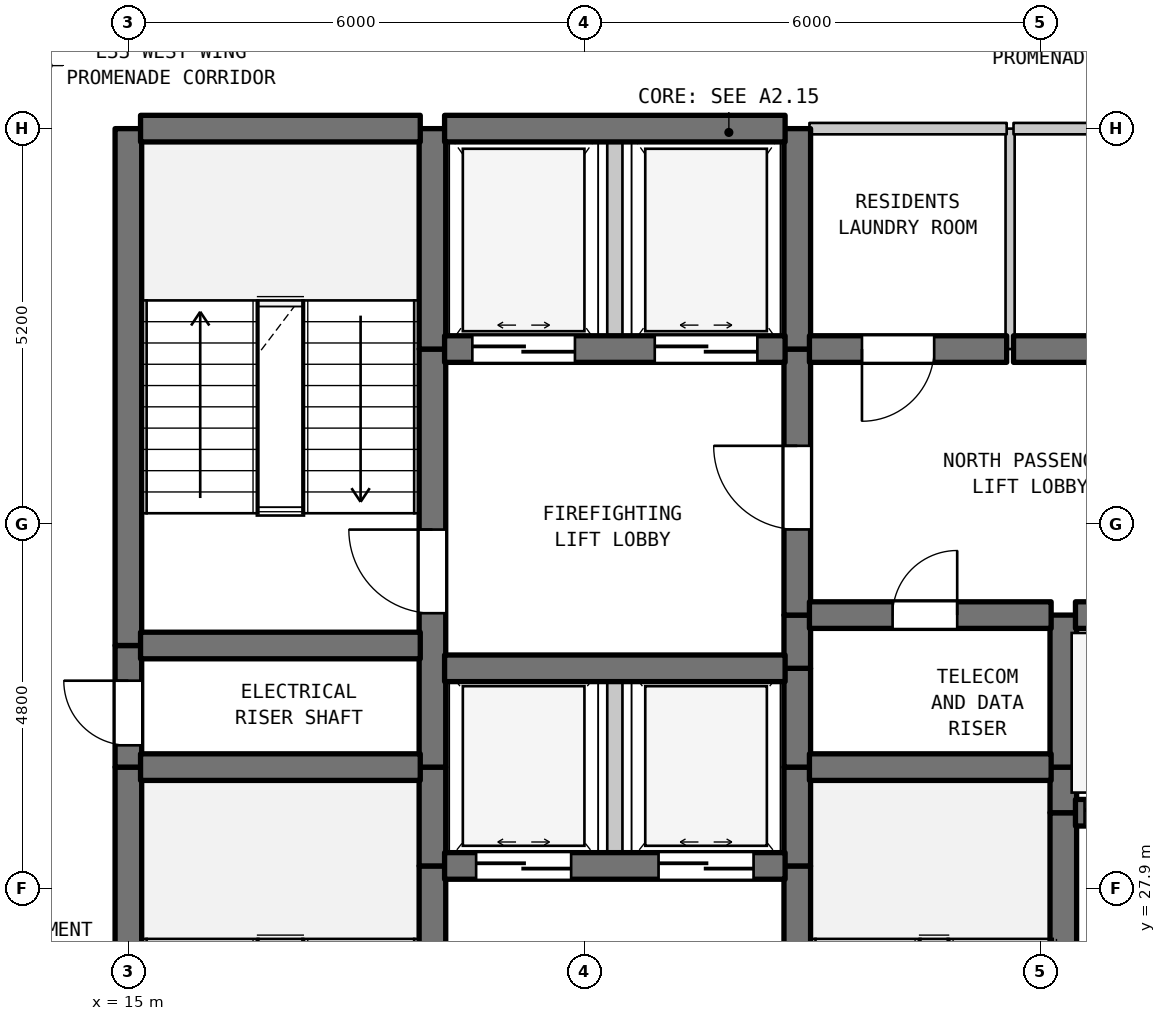
"""IFC4 building model, lengths in metres.
Left out: names, types, materials, properties, quantities, classifications, styles, units other than length and angle.
Written with IfcOpenShell. Run it as: python <this file> out.ifc"""

import sys

from ifc_helpers import new_model, si_unit, direction, frame, frame_2d, origin, place, context, subcontext, project, spatial, rectangle, extrude, element, fill, save


model = new_model("IFC4")
c1 = context("Model", 3, precision=1e-05, world=origin(), true_north=direction((0.0, 1.0)))
c2 = subcontext(c1, "Body", "Model", "MODEL_VIEW")
j1 = project(units=[si_unit("LENGTHUNIT", "METRE"), si_unit("PLANEANGLEUNIT", "RADIAN")], contexts=[c1])
p1 = place(None, origin())
s1 = spatial("IfcSite", under=j1, at=p1, CompositionType="ELEMENT")
p2 = place(p1, origin())
s2 = spatial("IfcBuilding", under=s1, at=p2, CompositionType="ELEMENT")
p3 = place(p2, frame((0.0, 0.0, 137.2)))
s3 = spatial("IfcBuildingStorey", under=s2, at=p3, CompositionType="ELEMENT", Elevation=137.2)
p4 = place(p3, frame((15.0, 22.7, 0.0), z_axis=(0.0, 0.0, 1.0), x_axis=(0.0, 1.0, 0.0)))
e1 = element("IfcWall", 1, at=p4, inside=s3, PredefinedType="SHEAR", context=c2, shape_type="SweptSolid", body=[
    extrude(rectangle(XDim=6.8, YDim=0.35, at=frame_2d((3.4, 0.0))), origin(), (0.0, 0.0, 1.0), 3.385),
])
p5 = place(p3, frame((15.0, 29.5, 0.0), z_axis=(0.0, 0.0, 1.0), x_axis=(0.0, 1.0, 0.0)))
e2 = element("IfcWall", 2, at=p5, inside=s3, PredefinedType="SHEAR", context=c2, shape_type="SweptSolid", body=[
    extrude(rectangle(XDim=1.6, YDim=0.35, at=frame_2d((0.8, 0.0))), origin(), (0.0, 0.0, 1.0), 3.385),
])
p6 = place(p5, frame((0.287, 0.0, 0.0)))
e3 = element("IfcOpeningElement", 3, at=p6, cuts=e2, PredefinedType="OPENING", context=c2, shape_type="SweptSolid", body=[
    extrude(rectangle(XDim=0.85, YDim=2.1, at=frame_2d((0.425, 1.05))), frame((0.0, 0.185, 0.0), z_axis=(0.0, -1.0, 0.0), x_axis=(1.0, 0.0, 0.0)), (0.0, 0.0, 1.0), 0.37),
])
p7 = place(p3, frame((15.0, 31.1, 0.0), z_axis=(0.0, 0.0, 1.0), x_axis=(0.0, 1.0, 0.0)))
e4 = element("IfcWall", 4, at=p7, inside=s3, PredefinedType="SHEAR", context=c2, shape_type="SweptSolid", body=[
    extrude(rectangle(XDim=6.8, YDim=0.35, at=frame_2d((3.4, 0.0))), origin(), (0.0, 0.0, 1.0), 3.385),
])
p8 = place(p3, frame((19.0, 22.7, 0.0), z_axis=(0.0, 0.0, 1.0), x_axis=(0.0, 1.0, 0.0)))
e5 = element("IfcWall", 5, at=p8, inside=s3, PredefinedType="SHEAR", context=c2, shape_type="SweptSolid", body=[
    extrude(rectangle(XDim=5.5, YDim=0.35, at=frame_2d((2.75, 0.0))), origin(), (0.0, 0.0, 1.0), 3.385),
])
p9 = place(p8, frame((0.631, 0.0, 0.0)))
e6 = element("IfcOpeningElement", 6, at=p9, cuts=e5, PredefinedType="OPENING", context=c2, shape_type="SweptSolid", body=[
    extrude(rectangle(XDim=1.1, YDim=2.15, at=frame_2d((0.55, 1.075))), frame((0.0, 0.185, 0.0), z_axis=(0.0, -1.0, 0.0), x_axis=(1.0, 0.0, 0.0)), (0.0, 0.0, 1.0), 0.37),
])
p10 = place(p3, frame((19.0, 28.2, 0.0), z_axis=(0.0, 0.0, 1.0), x_axis=(0.0, 1.0, 0.0)))
e7 = element("IfcWall", 7, at=p10, inside=s3, PredefinedType="SHEAR", context=c2, shape_type="SweptSolid", body=[
    extrude(rectangle(XDim=1.3, YDim=0.35, at=frame_2d((0.65, 0.0))), origin(), (0.0, 0.0, 1.0), 3.385),
])
p11 = place(p3, frame((19.0, 29.5, 0.0), z_axis=(0.0, 0.0, 1.0), x_axis=(0.0, 1.0, 0.0)))
e8 = element("IfcWall", 8, at=p11, inside=s3, PredefinedType="SHEAR", context=c2, shape_type="SweptSolid", body=[
    extrude(rectangle(XDim=5.5, YDim=0.35, at=frame_2d((2.75, 0.0))), origin(), (0.0, 0.0, 1.0), 3.385),
])
p12 = place(p11, frame((2.025, 0.0, 0.0)))
e9 = element("IfcOpeningElement", 9, at=p12, cuts=e8, PredefinedType="OPENING", context=c2, shape_type="SweptSolid", body=[
    extrude(rectangle(XDim=1.1, YDim=2.15, at=frame_2d((0.55, 1.075))), frame((0.0, 0.185, 0.0), z_axis=(0.0, -1.0, 0.0), x_axis=(1.0, 0.0, 0.0)), (0.0, 0.0, 1.0), 0.37),
])
p13 = place(p3, frame((19.0, 35.0, 0.0), z_axis=(0.0, 0.0, 1.0), x_axis=(0.0, 1.0, 0.0)))
e10 = element("IfcWall", 10, at=p13, inside=s3, PredefinedType="SHEAR", context=c2, shape_type="SweptSolid", body=[
    extrude(rectangle(XDim=2.9, YDim=0.35, at=frame_2d((1.45, 0.0))), origin(), (0.0, 0.0, 1.0), 3.385),
])
p14 = place(p3, frame((21.4, 28.2, 0.0), z_axis=(0.0, 0.0, 1.0), x_axis=(0.0, 1.0, 0.0)))
e11 = element("IfcWall", 11, at=p14, inside=s3, PredefinedType="STANDARD", context=c2, shape_type="SweptSolid", body=[
    extrude(rectangle(XDim=2.6, YDim=0.2, at=frame_2d((1.3, 0.0))), origin(), (0.0, 0.0, 1.0), 3.385),
])
p15 = place(p3, frame((21.4, 35.0, 0.0), z_axis=(0.0, 0.0, 1.0), x_axis=(0.0, 1.0, 0.0)))
e12 = element("IfcWall", 12, at=p15, inside=s3, PredefinedType="STANDARD", context=c2, shape_type="SweptSolid", body=[
    extrude(rectangle(XDim=2.9, YDim=0.2, at=frame_2d((1.45, 0.0))), origin(), (0.0, 0.0, 1.0), 3.385),
])
p16 = place(p3, frame((23.8, 22.7, 0.0), z_axis=(0.0, 0.0, 1.0), x_axis=(0.0, 1.0, 0.0)))
e13 = element("IfcWall", 13, at=p16, inside=s3, PredefinedType="SHEAR", context=c2, shape_type="SweptSolid", body=[
    extrude(rectangle(XDim=5.5, YDim=0.35, at=frame_2d((2.75, 0.0))), origin(), (0.0, 0.0, 1.0), 3.385),
])
p17 = place(p16, frame((0.235, 0.0, 0.0)))
e14 = element("IfcOpeningElement", 14, at=p17, cuts=e13, PredefinedType="OPENING", context=c2, shape_type="SweptSolid", body=[
    extrude(rectangle(XDim=1.1, YDim=2.15, at=frame_2d((0.55, 1.075))), frame((0.0, 0.185, 0.0), z_axis=(0.0, -1.0, 0.0), x_axis=(1.0, 0.0, 0.0)), (0.0, 0.0, 1.0), 0.37),
])
for number, where, z_axis, x_axis in (
    (15, (23.8, 28.2, 0.0), (0.0, 0.0, 1.0), (0.0, 1.0, 0.0)),
    (16, (23.8, 29.5, 0.0), (0.0, 0.0, 1.0), (0.0, 1.0, 0.0)),
):
    element("IfcWall", number, at=place(p3, frame(where, z_axis=z_axis, x_axis=x_axis)), inside=s3, PredefinedType="SHEAR", context=c2, shape_type="SweptSolid", body=[
        extrude(rectangle(XDim=1.3, YDim=0.35, at=frame_2d((0.65, 0.0))), origin(), (0.0, 0.0, 1.0), 3.385),
    ])
p18 = place(p3, frame((23.8, 30.8, 0.0), z_axis=(0.0, 0.0, 1.0), x_axis=(0.0, 1.0, 0.0)))
e17 = element("IfcWall", 17, at=p18, inside=s3, PredefinedType="SHEAR", context=c2, shape_type="SweptSolid", body=[
    extrude(rectangle(XDim=0.7, YDim=0.35, at=frame_2d((0.35, 0.0))), origin(), (0.0, 0.0, 1.0), 3.385),
])
p19 = place(p3, frame((23.8, 31.5, 0.0), z_axis=(0.0, 0.0, 1.0), x_axis=(0.0, 1.0, 0.0)))
e18 = element("IfcWall", 18, at=p19, inside=s3, PredefinedType="SHEAR", context=c2, shape_type="SweptSolid", body=[
    extrude(rectangle(XDim=3.5, YDim=0.35, at=frame_2d((1.75, 0.0))), origin(), (0.0, 0.0, 1.0), 3.385),
])
p20 = place(p19, frame((1.127, 0.0, 0.0)))
e19 = element("IfcOpeningElement", 19, at=p20, cuts=e18, PredefinedType="OPENING", context=c2, shape_type="SweptSolid", body=[
    extrude(rectangle(XDim=1.1, YDim=2.15, at=frame_2d((0.55, 1.075))), frame((0.0, 0.185, 0.0), z_axis=(0.0, -1.0, 0.0), x_axis=(1.0, 0.0, 0.0)), (0.0, 0.0, 1.0), 0.37),
])
p21 = place(p3, frame((23.8, 35.0, 0.0), z_axis=(0.0, 0.0, 1.0), x_axis=(0.0, 1.0, 0.0)))
e20 = element("IfcWall", 20, at=p21, inside=s3, PredefinedType="SHEAR", context=c2, shape_type="SweptSolid", body=[
    extrude(rectangle(XDim=2.9, YDim=0.35, at=frame_2d((1.45, 0.0))), origin(), (0.0, 0.0, 1.0), 3.385),
])
p22 = place(p3, frame((26.6, 35.0, 0.0), z_axis=(0.0, 0.0, 1.0), x_axis=(0.0, 1.0, 0.0)))
e21 = element("IfcWall", 21, at=p22, inside=s3, PredefinedType="PARTITIONING", context=c2, shape_type="SweptSolid", body=[
    extrude(rectangle(XDim=2.9, YDim=0.12, at=frame_2d((1.45, 0.0))), origin(), (0.0, 0.0, 1.0), 3.385),
])
p23 = place(p3, frame((27.3, 25.6, 0.0), z_axis=(0.0, 0.0, 1.0), x_axis=(0.0, 1.0, 0.0)))
e22 = element("IfcWall", 22, at=p23, inside=s3, PredefinedType="SHEAR", context=c2, shape_type="SweptSolid", body=[
    extrude(rectangle(XDim=3.3, YDim=0.35, at=frame_2d((1.65, 0.0))), origin(), (0.0, 0.0, 1.0), 3.385),
])
p24 = place(p3, frame((27.3, 28.9, 0.0), z_axis=(0.0, 0.0, 1.0), x_axis=(0.0, 1.0, 0.0)))
e23 = element("IfcWall", 23, at=p24, inside=s3, PredefinedType="SHEAR", context=c2, shape_type="SweptSolid", body=[
    extrude(rectangle(XDim=0.6, YDim=0.35, at=frame_2d((0.3, 0.0))), origin(), (0.0, 0.0, 1.0), 3.385),
])
p25 = place(p3, frame((27.3, 29.5, 0.0), z_axis=(0.0, 0.0, 1.0), x_axis=(0.0, 1.0, 0.0)))
e24 = element("IfcWall", 24, at=p25, inside=s3, PredefinedType="SHEAR", context=c2, shape_type="SweptSolid", body=[
    extrude(rectangle(XDim=2.0, YDim=0.35, at=frame_2d((1.0, 0.0))), origin(), (0.0, 0.0, 1.0), 3.385),
])
p26 = place(p3, frame((19.16, 28.2, 0.0), z_axis=(0.0, 0.0, 1.0), x_axis=(1.0, 0.0, 0.0)))
e25 = element("IfcWall", 25, at=p26, inside=s3, PredefinedType="SHEAR", context=c2, shape_type="SweptSolid", body=[
    extrude(rectangle(XDim=4.48, YDim=0.35, at=frame_2d((2.24, 0.0))), origin(), (0.0, 0.0, 1.0), 3.385),
])
p27 = place(p26, frame((0.415, 0.0, 0.0)))
e26 = element("IfcOpeningElement", 26, at=p27, cuts=e25, PredefinedType="OPENING", context=c2, shape_type="SweptSolid", body=[
    extrude(rectangle(XDim=1.25, YDim=2.2, at=frame_2d((0.625, 1.1))), frame((0.0, 0.185, 0.0), z_axis=(0.0, -1.0, 0.0), x_axis=(1.0, 0.0, 0.0)), (0.0, 0.0, 1.0), 0.37),
])
p28 = place(p26, frame((2.815, 0.0, 0.0)))
e27 = element("IfcOpeningElement", 27, at=p28, cuts=e25, PredefinedType="OPENING", context=c2, shape_type="SweptSolid", body=[
    extrude(rectangle(XDim=1.25, YDim=2.2, at=frame_2d((0.625, 1.1))), frame((0.0, 0.185, 0.0), z_axis=(0.0, -1.0, 0.0), x_axis=(1.0, 0.0, 0.0)), (0.0, 0.0, 1.0), 0.37),
])
p29 = place(p3, frame((27.46, 28.9, 0.0), z_axis=(0.0, 0.0, 1.0), x_axis=(1.0, 0.0, 0.0)))
e28 = element("IfcWall", 28, at=p29, inside=s3, PredefinedType="SHEAR", context=c2, shape_type="SweptSolid", body=[
    extrude(rectangle(XDim=3.18, YDim=0.35, at=frame_2d((1.59, 0.0))), origin(), (0.0, 0.0, 1.0), 3.385),
])
p30 = place(p29, frame((0.12, 0.0, 0.0)))
e29 = element("IfcOpeningElement", 29, at=p30, cuts=e28, PredefinedType="OPENING", context=c2, shape_type="SweptSolid", body=[
    extrude(rectangle(XDim=1.25, YDim=2.2, at=frame_2d((0.625, 1.1))), frame((0.0, 0.185, 0.0), z_axis=(0.0, -1.0, 0.0), x_axis=(1.0, 0.0, 0.0)), (0.0, 0.0, 1.0), 0.37),
])
p31 = place(p29, frame((1.81, 0.0, 0.0)))
e30 = element("IfcOpeningElement", 30, at=p31, cuts=e28, PredefinedType="OPENING", context=c2, shape_type="SweptSolid", body=[
    extrude(rectangle(XDim=1.25, YDim=2.2, at=frame_2d((0.625, 1.1))), frame((0.0, 0.185, 0.0), z_axis=(0.0, -1.0, 0.0), x_axis=(1.0, 0.0, 0.0)), (0.0, 0.0, 1.0), 0.37),
])
p32 = place(p3, frame((15.16, 29.5, 0.0), z_axis=(0.0, 0.0, 1.0), x_axis=(1.0, 0.0, 0.0)))
e31 = element("IfcWall", 31, at=p32, inside=s3, PredefinedType="SHEAR", context=c2, shape_type="SweptSolid", body=[
    extrude(rectangle(XDim=3.68, YDim=0.35, at=frame_2d((1.84, 0.0))), origin(), (0.0, 0.0, 1.0), 3.385),
])
p33 = place(p3, frame((23.96, 29.5, 0.0), z_axis=(0.0, 0.0, 1.0), x_axis=(1.0, 0.0, 0.0)))
e32 = element("IfcWall", 32, at=p33, inside=s3, PredefinedType="SHEAR", context=c2, shape_type="SweptSolid", body=[
    extrude(rectangle(XDim=3.18, YDim=0.35, at=frame_2d((1.59, 0.0))), origin(), (0.0, 0.0, 1.0), 3.385),
])
p34 = place(p3, frame((19.16, 30.8, 0.0), z_axis=(0.0, 0.0, 1.0), x_axis=(1.0, 0.0, 0.0)))
e33 = element("IfcWall", 33, at=p34, inside=s3, PredefinedType="SHEAR", context=c2, shape_type="SweptSolid", body=[
    extrude(rectangle(XDim=4.48, YDim=0.35, at=frame_2d((2.24, 0.0))), origin(), (0.0, 0.0, 1.0), 3.385),
])
p35 = place(p3, frame((15.16, 31.1, 0.0), z_axis=(0.0, 0.0, 1.0), x_axis=(1.0, 0.0, 0.0)))
e34 = element("IfcWall", 34, at=p35, inside=s3, PredefinedType="SHEAR", context=c2, shape_type="SweptSolid", body=[
    extrude(rectangle(XDim=3.68, YDim=0.35, at=frame_2d((1.84, 0.0))), origin(), (0.0, 0.0, 1.0), 3.385),
])
p36 = place(p3, frame((23.96, 31.5, 0.0), z_axis=(0.0, 0.0, 1.0), x_axis=(1.0, 0.0, 0.0)))
e35 = element("IfcWall", 35, at=p36, inside=s3, PredefinedType="SHEAR", context=c2, shape_type="SweptSolid", body=[
    extrude(rectangle(XDim=3.18, YDim=0.35, at=frame_2d((1.59, 0.0))), origin(), (0.0, 0.0, 1.0), 3.385),
])
p37 = place(p36, frame((1.094, 0.0, 0.0)))
e36 = element("IfcOpeningElement", 36, at=p37, cuts=e35, PredefinedType="OPENING", context=c2, shape_type="SweptSolid", body=[
    extrude(rectangle(XDim=0.85, YDim=2.1, at=frame_2d((0.425, 1.05))), frame((0.0, 0.185, 0.0), z_axis=(0.0, -1.0, 0.0), x_axis=(1.0, 0.0, 0.0)), (0.0, 0.0, 1.0), 0.37),
])
p38 = place(p3, frame((27.46, 31.5, 0.0), z_axis=(0.0, 0.0, 1.0), x_axis=(1.0, 0.0, 0.0)))
e37 = element("IfcWall", 37, at=p38, inside=s3, PredefinedType="SHEAR", context=c2, shape_type="SweptSolid", body=[
    extrude(rectangle(XDim=3.18, YDim=0.35, at=frame_2d((1.59, 0.0))), origin(), (0.0, 0.0, 1.0), 3.385),
])
p39 = place(p3, frame((19.16, 35.0, 0.0), z_axis=(0.0, 0.0, 1.0), x_axis=(1.0, 0.0, 0.0)))
e38 = element("IfcWall", 38, at=p39, inside=s3, PredefinedType="SHEAR", context=c2, shape_type="SweptSolid", body=[
    extrude(rectangle(XDim=4.48, YDim=0.35, at=frame_2d((2.24, 0.0))), origin(), (0.0, 0.0, 1.0), 3.385),
])
p40 = place(p39, frame((0.365, 0.0, 0.0)))
e39 = element("IfcOpeningElement", 39, at=p40, cuts=e38, PredefinedType="OPENING", context=c2, shape_type="SweptSolid", body=[
    extrude(rectangle(XDim=1.35, YDim=2.2, at=frame_2d((0.675, 1.1))), frame((0.0, 0.185, 0.0), z_axis=(0.0, -1.0, 0.0), x_axis=(1.0, 0.0, 0.0)), (0.0, 0.0, 1.0), 0.37),
])
p41 = place(p39, frame((2.765, 0.0, 0.0)))
e40 = element("IfcOpeningElement", 40, at=p41, cuts=e38, PredefinedType="OPENING", context=c2, shape_type="SweptSolid", body=[
    extrude(rectangle(XDim=1.35, YDim=2.2, at=frame_2d((0.675, 1.1))), frame((0.0, 0.185, 0.0), z_axis=(0.0, -1.0, 0.0), x_axis=(1.0, 0.0, 0.0)), (0.0, 0.0, 1.0), 0.37),
])
p42 = place(p3, frame((23.96, 35.0, 0.0), z_axis=(0.0, 0.0, 1.0), x_axis=(1.0, 0.0, 0.0)))
e41 = element("IfcWall", 41, at=p42, inside=s3, PredefinedType="SHEAR", context=c2, shape_type="SweptSolid", body=[
    extrude(rectangle(XDim=2.595, YDim=0.35, at=frame_2d((1.297, 0.0))), origin(), (0.0, 0.0, 1.0), 3.385),
])
p43 = place(p42, frame((0.691, 0.0, 0.0)))
e42 = element("IfcOpeningElement", 42, at=p43, cuts=e41, PredefinedType="OPENING", context=c2, shape_type="SweptSolid", body=[
    extrude(rectangle(XDim=0.95, YDim=2.15, at=frame_2d((0.475, 1.075))), frame((0.0, 0.185, 0.0), z_axis=(0.0, -1.0, 0.0), x_axis=(1.0, 0.0, 0.0)), (0.0, 0.0, 1.0), 0.37),
])
p44 = place(p3, frame((26.645, 35.0, 0.0), z_axis=(0.0, 0.0, 1.0), x_axis=(1.0, 0.0, 0.0)))
e43 = element("IfcWall", 43, at=p44, inside=s3, PredefinedType="SHEAR", context=c2, shape_type="SweptSolid", body=[
    extrude(rectangle(XDim=3.995, YDim=0.35, at=frame_2d((1.998, 0.0))), origin(), (0.0, 0.0, 1.0), 3.385),
])
p45 = place(p44, frame((1.508, 0.0, 0.0)))
e44 = element("IfcOpeningElement", 44, at=p45, cuts=e43, PredefinedType="OPENING", context=c2, shape_type="SweptSolid", body=[
    extrude(rectangle(XDim=0.95, YDim=2.15, at=frame_2d((0.475, 1.075))), frame((0.0, 0.185, 0.0), z_axis=(0.0, -1.0, 0.0), x_axis=(1.0, 0.0, 0.0)), (0.0, 0.0, 1.0), 0.37),
])
p46 = place(p3, frame((15.16, 37.9, 0.0), z_axis=(0.0, 0.0, 1.0), x_axis=(1.0, 0.0, 0.0)))
e45 = element("IfcWall", 45, at=p46, inside=s3, PredefinedType="SHEAR", context=c2, shape_type="SweptSolid", body=[
    extrude(rectangle(XDim=3.68, YDim=0.35, at=frame_2d((1.84, 0.0))), origin(), (0.0, 0.0, 1.0), 3.385),
])
p47 = place(p3, frame((19.16, 37.9, 0.0), z_axis=(0.0, 0.0, 1.0), x_axis=(1.0, 0.0, 0.0)))
e46 = element("IfcWall", 46, at=p47, inside=s3, PredefinedType="SHEAR", context=c2, shape_type="SweptSolid", body=[
    extrude(rectangle(XDim=4.48, YDim=0.35, at=frame_2d((2.24, 0.0))), origin(), (0.0, 0.0, 1.0), 3.385),
])
p48 = place(p3, frame((23.96, 37.9, 0.0), z_axis=(0.0, 0.0, 1.0), x_axis=(1.0, 0.0, 0.0)))
e47 = element("IfcWall", 47, at=p48, inside=s3, PredefinedType="STANDARD", context=c2, shape_type="SweptSolid", body=[
    extrude(rectangle(XDim=2.595, YDim=0.15, at=frame_2d((1.297, 0.0))), origin(), (0.0, 0.0, 1.0), 2.885),
])
p49 = place(p3, frame((26.645, 37.9, 0.0), z_axis=(0.0, 0.0, 1.0), x_axis=(1.0, 0.0, 0.0)))
e48 = element("IfcWall", 48, at=p49, inside=s3, PredefinedType="STANDARD", context=c2, shape_type="SweptSolid", body=[
    extrude(rectangle(XDim=4.095, YDim=0.15, at=frame_2d((2.047, 0.0))), origin(), (0.0, 0.0, 1.0), 2.885),
])
p50 = place(p6, origin())
e49 = element("IfcDoor", 49, at=p50, inside=s3, OperationType="SINGLE_SWING_RIGHT", PredefinedType="DOOR", context=c2, shape_type="SweptSolid", body=[
    extrude(rectangle(XDim=0.85, YDim=2.1, at=frame_2d((0.425, 1.05))), frame((0.0, 0.025, 0.0), z_axis=(0.0, -1.0, 0.0), x_axis=(1.0, 0.0, 0.0)), (0.0, 0.0, 1.0), 0.05),
])
fill(e3, e49)
p51 = place(p12, origin())
e50 = element("IfcDoor", 50, at=p51, inside=s3, OperationType="SINGLE_SWING_RIGHT", PredefinedType="DOOR", context=c2, shape_type="SweptSolid", body=[
    extrude(rectangle(XDim=1.1, YDim=2.15, at=frame_2d((0.55, 1.075))), frame((0.0, 0.025, 0.0), z_axis=(0.0, -1.0, 0.0), x_axis=(1.0, 0.0, 0.0)), (0.0, 0.0, 1.0), 0.05),
])
fill(e9, e50)
p52 = place(p20, origin())
e51 = element("IfcDoor", 51, at=p52, inside=s3, OperationType="SINGLE_SWING_RIGHT", PredefinedType="DOOR", context=c2, shape_type="SweptSolid", body=[
    extrude(rectangle(XDim=1.1, YDim=2.15, at=frame_2d((0.55, 1.075))), frame((0.0, 0.025, 0.0), z_axis=(0.0, -1.0, 0.0), x_axis=(1.0, 0.0, 0.0)), (0.0, 0.0, 1.0), 0.05),
])
fill(e19, e51)
p53 = place(p27, origin())
e52 = element("IfcDoor", 52, at=p53, inside=s3, OperationType="DOUBLE_DOOR_SLIDING", PredefinedType="DOOR", context=c2, shape_type="SweptSolid", body=[
    extrude(rectangle(XDim=1.25, YDim=2.2, at=frame_2d((0.625, 1.1))), frame((0.0, 0.025, 0.0), z_axis=(0.0, -1.0, 0.0), x_axis=(1.0, 0.0, 0.0)), (0.0, 0.0, 1.0), 0.05),
])
fill(e26, e52)
p54 = place(p28, origin())
e53 = element("IfcDoor", 53, at=p54, inside=s3, OperationType="DOUBLE_DOOR_SLIDING", PredefinedType="DOOR", context=c2, shape_type="SweptSolid", body=[
    extrude(rectangle(XDim=1.25, YDim=2.2, at=frame_2d((0.625, 1.1))), frame((0.0, 0.025, 0.0), z_axis=(0.0, -1.0, 0.0), x_axis=(1.0, 0.0, 0.0)), (0.0, 0.0, 1.0), 0.05),
])
fill(e27, e53)
p55 = place(p30, origin())
e54 = element("IfcDoor", 54, at=p55, inside=s3, OperationType="DOUBLE_DOOR_SLIDING", PredefinedType="DOOR", context=c2, shape_type="SweptSolid", body=[
    extrude(rectangle(XDim=1.25, YDim=2.2, at=frame_2d((0.625, 1.1))), frame((0.0, 0.025, 0.0), z_axis=(0.0, -1.0, 0.0), x_axis=(1.0, 0.0, 0.0)), (0.0, 0.0, 1.0), 0.05),
])
fill(e29, e54)
p56 = place(p37, origin())
e55 = element("IfcDoor", 55, at=p56, inside=s3, OperationType="SINGLE_SWING_RIGHT", PredefinedType="DOOR", context=c2, shape_type="SweptSolid", body=[
    extrude(rectangle(XDim=0.85, YDim=2.1, at=frame_2d((0.425, 1.05))), frame((0.0, 0.025, 0.0), z_axis=(0.0, -1.0, 0.0), x_axis=(1.0, 0.0, 0.0)), (0.0, 0.0, 1.0), 0.05),
])
fill(e36, e55)
p57 = place(p40, origin())
e56 = element("IfcDoor", 56, at=p57, inside=s3, OperationType="DOUBLE_DOOR_SLIDING", PredefinedType="DOOR", context=c2, shape_type="SweptSolid", body=[
    extrude(rectangle(XDim=1.35, YDim=2.2, at=frame_2d((0.675, 1.1))), frame((0.0, 0.025, 0.0), z_axis=(0.0, -1.0, 0.0), x_axis=(1.0, 0.0, 0.0)), (0.0, 0.0, 1.0), 0.05),
])
fill(e39, e56)
p58 = place(p41, origin())
e57 = element("IfcDoor", 57, at=p58, inside=s3, OperationType="DOUBLE_DOOR_SLIDING", PredefinedType="DOOR", context=c2, shape_type="SweptSolid", body=[
    extrude(rectangle(XDim=1.35, YDim=2.2, at=frame_2d((0.675, 1.1))), frame((0.0, 0.025, 0.0), z_axis=(0.0, -1.0, 0.0), x_axis=(1.0, 0.0, 0.0)), (0.0, 0.0, 1.0), 0.05),
])
fill(e40, e57)
p59 = place(p43, frame((0.95, 0.0, 0.0), z_axis=(0.0, 0.0, 1.0), x_axis=(-1.0, 0.0, 0.0)))
e58 = element("IfcDoor", 58, at=p59, inside=s3, OperationType="SINGLE_SWING_LEFT", PredefinedType="DOOR", context=c2, shape_type="SweptSolid", body=[
    extrude(rectangle(XDim=0.95, YDim=2.15, at=frame_2d((0.475, 1.075))), frame((0.0, 0.025, 0.0), z_axis=(0.0, -1.0, 0.0), x_axis=(1.0, 0.0, 0.0)), (0.0, 0.0, 1.0), 0.05),
])
fill(e42, e58)
save(model, sys.argv[1])
